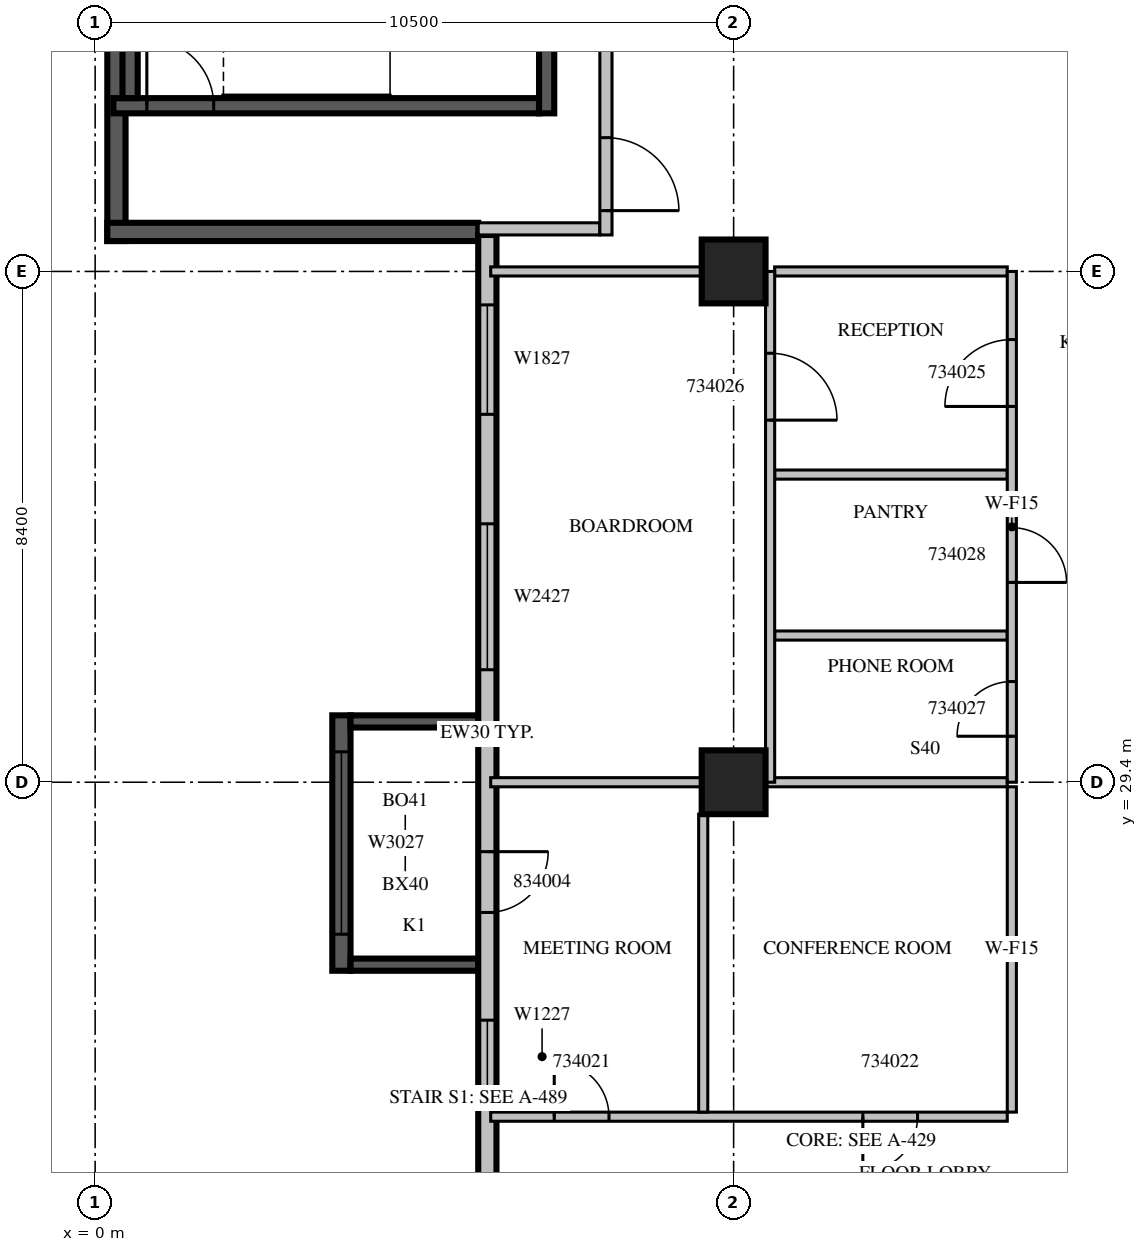
"""IFC4 building model, lengths in metres.
Left out: names, types, materials, properties, quantities, classifications, styles, units other than length and angle.
Written with IfcOpenShell. Run it as: python <this file> out.ifc"""

import sys

from ifc_helpers import new_model, si_unit, direction, frame, frame_2d, origin, origin_2d, place, context, subcontext, project, spatial, rectangle, extrude, source, transform, mapped, element, fill, save


model = new_model("IFC4")
c1 = context("Model", 3, precision=1e-05, world=origin(), true_north=direction((0.0, 1.0)))
c2 = subcontext(c1, "Body", "Model", "MODEL_VIEW")
j1 = project(units=[si_unit("LENGTHUNIT", "METRE"), si_unit("PLANEANGLEUNIT", "RADIAN")], contexts=[c1])
p1 = place(None, origin())
s1 = spatial("IfcSite", under=j1, at=p1, CompositionType="ELEMENT")
p2 = place(p1, origin())
s2 = spatial("IfcBuilding", under=s1, at=p2, CompositionType="ELEMENT")
p3 = place(p2, frame((0.0, 0.0, 153.9)))
s3 = spatial("IfcBuildingStorey", under=s2, at=p3, CompositionType="ELEMENT", Elevation=153.9)
m1 = source(origin(), c2, "Body", "SweptSolid", [
    extrude(rectangle(XDim=1.05, YDim=1.05, at=origin_2d()), origin(), (0.0, 0.0, 1.0), 4.2),
])
for number, where, z_axis, x_axis in (
    (1, (10.5, 29.4, 0.0), (0.0, 0.0, 1.0), (1.0, 0.0, 0.0)),
    (2, (10.5, 37.8, 0.0), (0.0, 0.0, 1.0), (1.0, 0.0, 0.0)),
):
    element("IfcColumn", number, at=place(p3, frame(where, z_axis=z_axis, x_axis=x_axis)), inside=s3, PredefinedType="COLUMN", context=c2, shape_type="MappedRepresentation", body=[
        mapped(m1, transform((0.0, 0.0, 0.0), scale=1.0)),
    ])
m2 = source(origin(), c2, "Body", "SweptSolid", [
    extrude(rectangle(XDim=4.2, YDim=0.3, at=frame_2d((2.1, 0.0))), origin(), (0.0, 0.0, 1.0), 3.8),
])
p4 = place(p3, frame((4.05, 30.5, 0.0), z_axis=(0.0, 0.0, 1.0), x_axis=(0.0, -1.0, 0.0)))
e3 = element("IfcWall", 3, at=p4, inside=s3, PredefinedType="SOLIDWALL", context=c2, shape_type="MappedRepresentation", body=[
    mapped(m2, transform((0.0, 0.0, 0.0), scale=1.0)),
])
m3 = source(origin(), c2, "Body", "SweptSolid", [
    extrude(rectangle(XDim=3.0, YDim=2.7, at=frame_2d((1.5, 1.35))), frame((0.0, 0.16, 0.0), z_axis=(0.0, -1.0, 0.0), x_axis=(1.0, 0.0, 0.0)), (0.0, 0.0, 1.0), 0.32),
])
p5 = place(p4, frame((0.6, 0.0, 0.6)))
e4 = element("IfcOpeningElement", 4, at=p5, cuts=e3, PredefinedType="OPENING", context=c2, shape_type="MappedRepresentation", body=[
    mapped(m3, transform((0.0, 0.0, 0.0), scale=1.0)),
])
m4 = source(origin(), c2, "Body", "SweptSolid", [
    extrude(rectangle(XDim=2.1, YDim=0.2, at=frame_2d((1.05, 0.0))), origin(), (0.0, 0.0, 1.0), 3.8),
])
for number, where, z_axis, x_axis in (
    (5, (6.3, 30.4, 0.0), (0.0, 0.0, 1.0), (-1.0, 0.0, 0.0)),
    (6, (6.3, 26.4, 0.0), (0.0, 0.0, 1.0), (-1.0, 0.0, 0.0)),
):
    element("IfcWall", number, at=place(p3, frame(where, z_axis=z_axis, x_axis=x_axis)), inside=s3, PredefinedType="SOLIDWALL", context=c2, shape_type="MappedRepresentation", body=[
        mapped(m4, transform((0.0, 0.0, 0.0), scale=1.0)),
    ])
m5 = source(origin(), c2, "Body", "SweptSolid", [
    extrude(rectangle(XDim=5.65, YDim=0.3, at=frame_2d((2.825, 0.0))), origin(), (0.0, 0.0, 1.0), 3.8),
])
p6 = place(p3, frame((0.35, 43.95, 0.0), z_axis=(0.0, 0.0, 1.0), x_axis=(0.0, -1.0, 0.0)))
e7 = element("IfcWall", 7, at=p6, inside=s3, PredefinedType="SOLIDWALL", context=c2, shape_type="MappedRepresentation", body=[
    mapped(m5, transform((0.0, 0.0, 0.0), scale=1.0)),
])
m6 = source(origin(), c2, "Body", "SweptSolid", [
    extrude(rectangle(XDim=6.1, YDim=0.3, at=frame_2d((3.05, 0.0))), origin(), (0.0, 0.0, 1.0), 3.8),
])
p7 = place(p3, frame((0.2, 38.45, 0.0), z_axis=(0.0, 0.0, 1.0), x_axis=(1.0, 0.0, 0.0)))
e8 = element("IfcWall", 8, at=p7, inside=s3, PredefinedType="SOLIDWALL", context=c2, shape_type="MappedRepresentation", body=[
    mapped(m6, transform((0.0, 0.0, 0.0), scale=1.0)),
])
m7 = source(origin(), c2, "Body", "SweptSolid", [
    extrude(rectangle(XDim=16.4, YDim=0.3, at=frame_2d((8.2, 0.0))), origin(), (0.0, 0.0, 1.0), 3.8),
])
p8 = place(p3, frame((6.45, 38.4, 0.0), z_axis=(0.0, 0.0, 1.0), x_axis=(0.0, -1.0, 0.0)))
e9 = element("IfcWall", 9, at=p8, inside=s3, PredefinedType="STANDARD", context=c2, shape_type="MappedRepresentation", body=[
    mapped(m7, transform((0.0, 0.0, 0.0), scale=1.0)),
])
m8 = source(origin(), c2, "Body", "SweptSolid", [
    extrude(rectangle(XDim=1.8, YDim=2.7, at=frame_2d((0.9, 1.35))), frame((0.0, 0.16, 0.0), z_axis=(0.0, -1.0, 0.0), x_axis=(1.0, 0.0, 0.0)), (0.0, 0.0, 1.0), 0.32),
])
p9 = place(p8, frame((1.15, 0.0, 0.6)))
e10 = element("IfcOpeningElement", 10, at=p9, cuts=e9, PredefinedType="OPENING", context=c2, shape_type="MappedRepresentation", body=[
    mapped(m8, transform((0.0, 0.0, 0.0), scale=1.0)),
])
m9 = source(origin(), c2, "Body", "SweptSolid", [
    extrude(rectangle(XDim=2.4, YDim=2.7, at=frame_2d((1.2, 1.35))), frame((0.0, 0.16, 0.0), z_axis=(0.0, -1.0, 0.0), x_axis=(1.0, 0.0, 0.0)), (0.0, 0.0, 1.0), 0.32),
])
p10 = place(p8, frame((4.75, 0.0, 0.6)))
e11 = element("IfcOpeningElement", 11, at=p10, cuts=e9, PredefinedType="OPENING", context=c2, shape_type="MappedRepresentation", body=[
    mapped(m9, transform((0.0, 0.0, 0.0), scale=1.0)),
])
m10 = source(origin(), c2, "Body", "SweptSolid", [
    extrude(rectangle(XDim=1.2, YDim=2.7, at=frame_2d((0.6, 1.35))), frame((0.0, 0.16, 0.0), z_axis=(0.0, -1.0, 0.0), x_axis=(1.0, 0.0, 0.0)), (0.0, 0.0, 1.0), 0.32),
])
p11 = place(p8, frame((12.912, 0.0, 0.6)))
e12 = element("IfcOpeningElement", 12, at=p11, cuts=e9, PredefinedType="OPENING", context=c2, shape_type="MappedRepresentation", body=[
    mapped(m10, transform((0.0, 0.0, 0.0), scale=1.0)),
])
m11 = source(origin(), c2, "Body", "SweptSolid", [
    extrude(rectangle(XDim=1.0, YDim=2.1, at=frame_2d((0.5, 1.05))), frame((0.0, 0.16, 0.0), z_axis=(0.0, -1.0, 0.0), x_axis=(1.0, 0.0, 0.0)), (0.0, 0.0, 1.0), 0.32),
])
p12 = place(p8, frame((10.142, 0.0, 0.0)))
e13 = element("IfcOpeningElement", 13, at=p12, cuts=e9, PredefinedType="OPENING", context=c2, shape_type="MappedRepresentation", body=[
    mapped(m11, transform((0.0, 0.0, 0.0), scale=1.0)),
])
m12 = source(origin(), c2, "Body", "SweptSolid", [
    extrude(rectangle(XDim=7.0, YDim=0.25, at=frame_2d((3.5, 0.0))), origin(), (0.0, 0.0, 1.0), 3.8),
])
p13 = place(p3, frame((0.3, 40.525, 0.0), z_axis=(0.0, 0.0, 1.0), x_axis=(1.0, 0.0, 0.0)))
e14 = element("IfcWall", 14, at=p13, inside=s3, PredefinedType="SOLIDWALL", context=c2, shape_type="MappedRepresentation", body=[
    mapped(m12, transform((0.0, 0.0, 0.0), scale=1.0)),
])
m13 = source(origin(), c2, "Body", "SweptSolid", [
    extrude(rectangle(XDim=1.1, YDim=2.1, at=frame_2d((0.55, 1.05))), frame((0.0, 0.135, 0.0), z_axis=(0.0, -1.0, 0.0), x_axis=(1.0, 0.0, 0.0)), (0.0, 0.0, 1.0), 0.27),
])
p14 = place(p13, frame((0.55, 0.0, 0.0)))
e15 = element("IfcOpeningElement", 15, at=p14, cuts=e14, PredefinedType="OPENING", context=c2, shape_type="MappedRepresentation", body=[
    mapped(m13, transform((0.0, 0.0, 0.0), scale=1.0)),
])
m14 = source(origin(), c2, "Body", "SweptSolid", [
    extrude(rectangle(XDim=3.45, YDim=0.25, at=frame_2d((1.725, 0.0))), origin(), (0.0, 0.0, 1.0), 3.8),
])
p15 = place(p3, frame((7.425, 40.4, 0.0), z_axis=(0.0, 0.0, 1.0), x_axis=(0.0, 1.0, 0.0)))
e16 = element("IfcWall", 16, at=p15, inside=s3, PredefinedType="SOLIDWALL", context=c2, shape_type="MappedRepresentation", body=[
    mapped(m14, transform((0.0, 0.0, 0.0), scale=1.0)),
])
m15 = source(origin(), c2, "Body", "SweptSolid", [
    extrude(rectangle(XDim=2.95, YDim=0.25, at=frame_2d((1.475, 0.0))), origin(), (0.0, 0.0, 1.0), 3.8),
])
p16 = place(p3, frame((0.575, 40.65, 0.0), z_axis=(0.0, 0.0, 1.0), x_axis=(0.0, 1.0, 0.0)))
e17 = element("IfcWall", 17, at=p16, inside=s3, PredefinedType="SOLIDWALL", context=c2, shape_type="MappedRepresentation", body=[
    mapped(m15, transform((0.0, 0.0, 0.0), scale=1.0)),
])
m16 = source(origin(), c2, "Body", "SweptSolid", [
    extrude(rectangle(XDim=2.0, YDim=0.2, at=frame_2d((1.0, 0.0))), origin(), (0.0, 0.0, 1.0), 3.8),
])
p17 = place(p3, frame((6.3, 38.5, 0.0), z_axis=(0.0, 0.0, 1.0), x_axis=(1.0, 0.0, 0.0)))
e18 = element("IfcWall", 18, at=p17, inside=s3, PredefinedType="PARTITIONING", context=c2, shape_type="MappedRepresentation", body=[
    mapped(m16, transform((0.0, 0.0, 0.0), scale=1.0)),
])
m17 = source(origin(), c2, "Body", "SweptSolid", [
    extrude(rectangle(XDim=5.45, YDim=0.2, at=frame_2d((2.725, 0.0))), origin(), (0.0, 0.0, 1.0), 3.8),
])
p18 = place(p3, frame((8.4, 38.4, 0.0), z_axis=(0.0, 0.0, 1.0), x_axis=(0.0, 1.0, 0.0)))
e19 = element("IfcWall", 19, at=p18, inside=s3, PredefinedType="PARTITIONING", context=c2, shape_type="MappedRepresentation", body=[
    mapped(m17, transform((0.0, 0.0, 0.0), scale=1.0)),
])
m18 = source(origin(), c2, "Body", "SweptSolid", [
    extrude(rectangle(XDim=1.2, YDim=2.1, at=frame_2d((0.6, 1.05))), frame((0.0, 0.11, 0.0), z_axis=(0.0, -1.0, 0.0), x_axis=(1.0, 0.0, 0.0)), (0.0, 0.0, 1.0), 0.22),
])
p19 = place(p18, frame((0.4, 0.0, 0.0)))
e20 = element("IfcOpeningElement", 20, at=p19, cuts=e19, PredefinedType="OPENING", context=c2, shape_type="MappedRepresentation", body=[
    mapped(m18, transform((0.0, 0.0, 0.0), scale=1.0)),
])
m19 = source(origin(), c2, "Body", "SweptSolid", [
    extrude(rectangle(XDim=0.9, YDim=2.1, at=frame_2d((0.45, 1.05))), frame((0.0, 0.11, 0.0), z_axis=(0.0, -1.0, 0.0), x_axis=(1.0, 0.0, 0.0)), (0.0, 0.0, 1.0), 0.22),
])
p20 = place(p18, frame((3.25, 0.0, 0.0)))
e21 = element("IfcOpeningElement", 21, at=p20, cuts=e19, PredefinedType="OPENING", context=c2, shape_type="MappedRepresentation", body=[
    mapped(m19, transform((0.0, 0.0, 0.0), scale=1.0)),
])
m20 = source(origin(), c2, "Body", "SweptSolid", [
    extrude(rectangle(XDim=8.495, YDim=0.15, at=frame_2d((4.247, 0.0))), origin(), (0.0, 0.0, 1.0), 3.8),
])
p21 = place(p3, frame((6.505, 23.9, 0.0), z_axis=(0.0, 0.0, 1.0), x_axis=(1.0, 0.0, 0.0)))
e22 = element("IfcWall", 22, at=p21, inside=s3, PredefinedType="PARTITIONING", context=c2, shape_type="MappedRepresentation", body=[
    mapped(m20, transform((0.0, 0.0, 0.0), scale=1.0)),
])
m21 = source(origin(), c2, "Body", "SweptSolid", [
    extrude(rectangle(XDim=0.9, YDim=2.1, at=frame_2d((0.45, 1.05))), frame((0.0, 0.085, 0.0), z_axis=(0.0, -1.0, 0.0), x_axis=(1.0, 0.0, 0.0)), (0.0, 0.0, 1.0), 0.17),
])
p22 = place(p21, frame((1.045, 0.0, 0.0)))
e23 = element("IfcOpeningElement", 23, at=p22, cuts=e22, PredefinedType="OPENING", context=c2, shape_type="MappedRepresentation", body=[
    mapped(m21, transform((0.0, 0.0, 0.0), scale=1.0)),
])
p23 = place(p21, frame((6.12, 0.0, 0.0)))
e24 = element("IfcOpeningElement", 24, at=p23, cuts=e22, PredefinedType="OPENING", context=c2, shape_type="MappedRepresentation", body=[
    mapped(m21, transform((0.0, 0.0, 0.0), scale=1.0)),
])
m22 = source(origin(), c2, "Body", "SweptSolid", [
    extrude(rectangle(XDim=4.901, YDim=0.15, at=frame_2d((2.45, 0.0))), origin(), (0.0, 0.0, 1.0), 3.8),
])
p24 = place(p3, frame((10.0, 23.975, 0.0), z_axis=(0.0, 0.0, 1.0), x_axis=(0.0, 1.0, 0.0)))
e25 = element("IfcWall", 25, at=p24, inside=s3, PredefinedType="PARTITIONING", context=c2, shape_type="MappedRepresentation", body=[
    mapped(m22, transform((0.0, 0.0, 0.0), scale=1.0)),
])
m23 = source(origin(), c2, "Body", "SweptSolid", [
    extrude(rectangle(XDim=5.35, YDim=0.15, at=frame_2d((2.675, 0.0))), origin(), (0.0, 0.0, 1.0), 3.8),
])
p25 = place(p3, frame((15.075, 23.975, 0.0), z_axis=(0.0, 0.0, 1.0), x_axis=(0.0, 1.0, 0.0)))
e26 = element("IfcWall", 26, at=p25, inside=s3, PredefinedType="PARTITIONING", context=c2, shape_type="MappedRepresentation", body=[
    mapped(m23, transform((0.0, 0.0, 0.0), scale=1.0)),
])
m24 = source(origin(), c2, "Body", "SweptSolid", [
    extrude(rectangle(XDim=3.471, YDim=0.15, at=frame_2d((1.736, 0.0))), origin(), (0.0, 0.0, 1.0), 3.8),
])
p26 = place(p3, frame((9.976, 29.4, 0.0), z_axis=(0.0, 0.0, 1.0), x_axis=(-1.0, 0.0, 0.0)))
e27 = element("IfcWall", 27, at=p26, inside=s3, PredefinedType="PARTITIONING", context=c2, shape_type="MappedRepresentation", body=[
    mapped(m24, transform((0.0, 0.0, 0.0), scale=1.0)),
])
m25 = source(origin(), c2, "Body", "SweptSolid", [
    extrude(rectangle(XDim=3.976, YDim=0.15, at=frame_2d((1.988, 0.0))), origin(), (0.0, 0.0, 1.0), 3.8),
])
p27 = place(p3, frame((15.0, 29.4, 0.0), z_axis=(0.0, 0.0, 1.0), x_axis=(-1.0, 0.0, 0.0)))
e28 = element("IfcWall", 28, at=p27, inside=s3, PredefinedType="PARTITIONING", context=c2, shape_type="MappedRepresentation", body=[
    mapped(m25, transform((0.0, 0.0, 0.0), scale=1.0)),
])
m26 = source(origin(), c2, "Body", "SweptSolid", [
    extrude(rectangle(XDim=3.825, YDim=0.15, at=frame_2d((1.913, 0.0))), origin(), (0.0, 0.0, 1.0), 3.8),
])
for number, where, z_axis, x_axis in (
    (29, (15.0, 31.812, 0.0), (0.0, 0.0, 1.0), (-1.0, 0.0, 0.0)),
    (30, (15.0, 34.459, 0.0), (0.0, 0.0, 1.0), (-1.0, 0.0, 0.0)),
):
    element("IfcWall", number, at=place(p3, frame(where, z_axis=z_axis, x_axis=x_axis)), inside=s3, PredefinedType="PARTITIONING", context=c2, shape_type="MappedRepresentation", body=[
        mapped(m26, transform((0.0, 0.0, 0.0), scale=1.0)),
    ])
p28 = place(p3, frame((9.976, 37.8, 0.0), z_axis=(0.0, 0.0, 1.0), x_axis=(-1.0, 0.0, 0.0)))
e31 = element("IfcWall", 31, at=p28, inside=s3, PredefinedType="PARTITIONING", context=c2, shape_type="MappedRepresentation", body=[
    mapped(m24, transform((0.0, 0.0, 0.0), scale=1.0)),
])
p29 = place(p3, frame((15.0, 37.8, 0.0), z_axis=(0.0, 0.0, 1.0), x_axis=(-1.0, 0.0, 0.0)))
e32 = element("IfcWall", 32, at=p29, inside=s3, PredefinedType="PARTITIONING", context=c2, shape_type="MappedRepresentation", body=[
    mapped(m26, transform((0.0, 0.0, 0.0), scale=1.0)),
])
m27 = source(origin(), c2, "Body", "SweptSolid", [
    extrude(rectangle(XDim=8.4, YDim=0.15, at=frame_2d((4.2, 0.0))), origin(), (0.0, 0.0, 1.0), 3.8),
])
p30 = place(p3, frame((11.1, 29.4, 0.0), z_axis=(0.0, 0.0, 1.0), x_axis=(0.0, 1.0, 0.0)))
e33 = element("IfcWall", 33, at=p30, inside=s3, PredefinedType="PARTITIONING", context=c2, shape_type="MappedRepresentation", body=[
    mapped(m27, transform((0.0, 0.0, 0.0), scale=1.0)),
])
m28 = source(origin(), c2, "Body", "SweptSolid", [
    extrude(rectangle(XDim=1.1, YDim=2.1, at=frame_2d((0.55, 1.05))), frame((0.0, 0.085, 0.0), z_axis=(0.0, -1.0, 0.0), x_axis=(1.0, 0.0, 0.0)), (0.0, 0.0, 1.0), 0.17),
])
p31 = place(p30, frame((5.955, 0.0, 0.0)))
e34 = element("IfcOpeningElement", 34, at=p31, cuts=e33, PredefinedType="OPENING", context=c2, shape_type="MappedRepresentation", body=[
    mapped(m28, transform((0.0, 0.0, 0.0), scale=1.0)),
])
p32 = place(p3, frame((15.075, 29.4, 0.0), z_axis=(0.0, 0.0, 1.0), x_axis=(0.0, 1.0, 0.0)))
e35 = element("IfcWall", 35, at=p32, inside=s3, PredefinedType="PARTITIONING", context=c2, shape_type="MappedRepresentation", body=[
    mapped(m27, transform((0.0, 0.0, 0.0), scale=1.0)),
])
p33 = place(p32, frame((6.18, 0.0, 0.0)))
e36 = element("IfcOpeningElement", 36, at=p33, cuts=e35, PredefinedType="OPENING", context=c2, shape_type="MappedRepresentation", body=[
    mapped(m28, transform((0.0, 0.0, 0.0), scale=1.0)),
])
p34 = place(p32, frame((0.756, 0.0, 0.0)))
e37 = element("IfcOpeningElement", 37, at=p34, cuts=e35, PredefinedType="OPENING", context=c2, shape_type="MappedRepresentation", body=[
    mapped(m21, transform((0.0, 0.0, 0.0), scale=1.0)),
])
p35 = place(p32, frame((3.286, 0.0, 0.0)))
e38 = element("IfcOpeningElement", 38, at=p35, cuts=e35, PredefinedType="OPENING", context=c2, shape_type="MappedRepresentation", body=[
    mapped(m21, transform((0.0, 0.0, 0.0), scale=1.0)),
])
m29 = source(origin(), c2, "Body", "SweptSolid", [
    extrude(rectangle(XDim=3.0, YDim=2.7, at=frame_2d((1.5, 1.35))), frame((0.0, 0.03, 0.0), z_axis=(0.0, -1.0, 0.0), x_axis=(1.0, 0.0, 0.0)), (0.0, 0.0, 1.0), 0.06),
])
p36 = place(p5, origin())
e39 = element("IfcWindow", 39, at=p36, inside=s3, PartitioningType="SINGLE_PANEL", PredefinedType="WINDOW", context=c2, shape_type="MappedRepresentation", body=[
    mapped(m29, transform((0.0, 0.0, 0.0), scale=1.0)),
])
fill(e4, e39)
m30 = source(origin(), c2, "Body", "SweptSolid", [
    extrude(rectangle(XDim=1.8, YDim=2.7, at=frame_2d((0.9, 1.35))), frame((0.0, 0.03, 0.0), z_axis=(0.0, -1.0, 0.0), x_axis=(1.0, 0.0, 0.0)), (0.0, 0.0, 1.0), 0.06),
])
p37 = place(p9, origin())
e40 = element("IfcWindow", 40, at=p37, inside=s3, PartitioningType="SINGLE_PANEL", PredefinedType="WINDOW", context=c2, shape_type="MappedRepresentation", body=[
    mapped(m30, transform((0.0, 0.0, 0.0), scale=1.0)),
])
fill(e10, e40)
m31 = source(origin(), c2, "Body", "SweptSolid", [
    extrude(rectangle(XDim=2.4, YDim=2.7, at=frame_2d((1.2, 1.35))), frame((0.0, 0.03, 0.0), z_axis=(0.0, -1.0, 0.0), x_axis=(1.0, 0.0, 0.0)), (0.0, 0.0, 1.0), 0.06),
])
p38 = place(p10, origin())
e41 = element("IfcWindow", 41, at=p38, inside=s3, PartitioningType="SINGLE_PANEL", PredefinedType="WINDOW", context=c2, shape_type="MappedRepresentation", body=[
    mapped(m31, transform((0.0, 0.0, 0.0), scale=1.0)),
])
fill(e11, e41)
m32 = source(origin(), c2, "Body", "SweptSolid", [
    extrude(rectangle(XDim=1.2, YDim=2.7, at=frame_2d((0.6, 1.35))), frame((0.0, 0.03, 0.0), z_axis=(0.0, -1.0, 0.0), x_axis=(1.0, 0.0, 0.0)), (0.0, 0.0, 1.0), 0.06),
])
p39 = place(p11, origin())
e42 = element("IfcWindow", 42, at=p39, inside=s3, PartitioningType="SINGLE_PANEL", PredefinedType="WINDOW", context=c2, shape_type="MappedRepresentation", body=[
    mapped(m32, transform((0.0, 0.0, 0.0), scale=1.0)),
])
fill(e12, e42)
m33 = source(origin(), c2, "Body", "SweptSolid", [
    extrude(rectangle(XDim=1.1, YDim=2.1, at=frame_2d((0.55, 1.05))), frame((0.0, 0.025, 0.0), z_axis=(0.0, -1.0, 0.0), x_axis=(1.0, 0.0, 0.0)), (0.0, 0.0, 1.0), 0.05),
])
p40 = place(p14, origin())
e43 = element("IfcDoor", 43, at=p40, inside=s3, OperationType="SINGLE_SWING_LEFT", PredefinedType="DOOR", context=c2, shape_type="MappedRepresentation", body=[
    mapped(m33, transform((0.0, 0.0, 0.0), scale=1.0)),
])
fill(e15, e43)
m34 = source(origin(), c2, "Body", "SweptSolid", [
    extrude(rectangle(XDim=1.2, YDim=2.1, at=frame_2d((0.6, 1.05))), frame((0.0, 0.025, 0.0), z_axis=(0.0, -1.0, 0.0), x_axis=(1.0, 0.0, 0.0)), (0.0, 0.0, 1.0), 0.05),
])
p41 = place(p19, origin())
e44 = element("IfcDoor", 44, at=p41, inside=s3, OperationType="SINGLE_SWING_RIGHT", PredefinedType="DOOR", context=c2, shape_type="MappedRepresentation", body=[
    mapped(m34, transform((0.0, 0.0, 0.0), scale=1.0)),
])
fill(e20, e44)
m35 = source(origin(), c2, "Body", "SweptSolid", [
    extrude(rectangle(XDim=0.9, YDim=2.1, at=frame_2d((0.45, 1.05))), frame((0.0, 0.025, 0.0), z_axis=(0.0, -1.0, 0.0), x_axis=(1.0, 0.0, 0.0)), (0.0, 0.0, 1.0), 0.05),
])
p42 = place(p22, origin())
e45 = element("IfcDoor", 45, at=p42, inside=s3, OperationType="SINGLE_SWING_LEFT", PredefinedType="DOOR", context=c2, shape_type="MappedRepresentation", body=[
    mapped(m35, transform((0.0, 0.0, 0.0), scale=1.0)),
])
fill(e23, e45)
p43 = place(p23, origin())
e46 = element("IfcDoor", 46, at=p43, inside=s3, OperationType="SINGLE_SWING_RIGHT", PredefinedType="DOOR", context=c2, shape_type="MappedRepresentation", body=[
    mapped(m35, transform((0.0, 0.0, 0.0), scale=1.0)),
])
fill(e24, e46)
p44 = place(p33, origin())
e47 = element("IfcDoor", 47, at=p44, inside=s3, OperationType="SINGLE_SWING_LEFT", PredefinedType="DOOR", context=c2, shape_type="MappedRepresentation", body=[
    mapped(m33, transform((0.0, 0.0, 0.0), scale=1.0)),
])
fill(e36, e47)
p45 = place(p31, origin())
e48 = element("IfcDoor", 48, at=p45, inside=s3, OperationType="SINGLE_SWING_RIGHT", PredefinedType="DOOR", context=c2, shape_type="MappedRepresentation", body=[
    mapped(m33, transform((0.0, 0.0, 0.0), scale=1.0)),
])
fill(e34, e48)
p46 = place(p34, origin())
e49 = element("IfcDoor", 49, at=p46, inside=s3, OperationType="SINGLE_SWING_LEFT", PredefinedType="DOOR", context=c2, shape_type="MappedRepresentation", body=[
    mapped(m35, transform((0.0, 0.0, 0.0), scale=1.0)),
])
fill(e37, e49)
p47 = place(p35, origin())
e50 = element("IfcDoor", 50, at=p47, inside=s3, OperationType="SINGLE_SWING_RIGHT", PredefinedType="DOOR", context=c2, shape_type="MappedRepresentation", body=[
    mapped(m35, transform((0.0, 0.0, 0.0), scale=1.0)),
])
fill(e38, e50)
m36 = source(origin(), c2, "Body", "SweptSolid", [
    extrude(rectangle(XDim=1.0, YDim=2.1, at=frame_2d((0.5, 1.05))), frame((0.0, 0.025, 0.0), z_axis=(0.0, -1.0, 0.0), x_axis=(1.0, 0.0, 0.0)), (0.0, 0.0, 1.0), 0.05),
])
p48 = place(p12, origin())
e51 = element("IfcDoor", 51, at=p48, inside=s3, OperationType="SINGLE_SWING_LEFT", PredefinedType="DOOR", context=c2, shape_type="MappedRepresentation", body=[
    mapped(m36, transform((0.0, 0.0, 0.0), scale=1.0)),
])
fill(e13, e51)
save(model, sys.argv[1])
